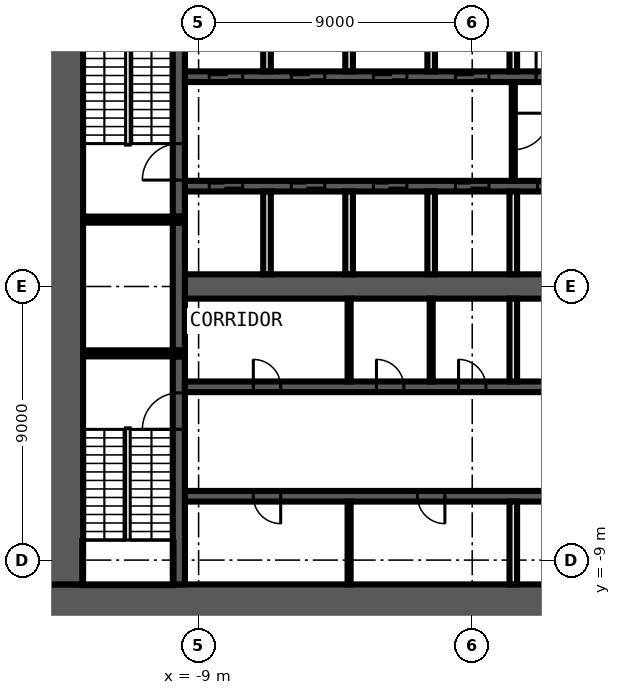
"""IFC4 building model, lengths in metres.
Left out: names, types, materials, properties, quantities, classifications, styles, units other than length and angle.
Written with IfcOpenShell. Run it as: python <this file> out.ifc"""

import sys

from ifc_helpers import new_model, si_unit, direction, frame, frame_2d, origin, place, context, subcontext, project, spatial, rectangle, extrude, element, fill, save


model = new_model("IFC4")
c1 = context("Model", 3, precision=1e-05, world=origin(), true_north=direction((0.0, 1.0)))
c2 = subcontext(c1, "Body", "Model", "MODEL_VIEW")
j1 = project(units=[si_unit("LENGTHUNIT", "METRE"), si_unit("PLANEANGLEUNIT", "RADIAN")], contexts=[c1])
p1 = place(None, origin())
s1 = spatial("IfcSite", under=j1, at=p1, CompositionType="ELEMENT")
p2 = place(p1, origin())
s2 = spatial("IfcBuilding", under=s1, at=p2, CompositionType="ELEMENT")
p3 = place(p2, frame((0.0, 0.0, 33.0)))
s3 = spatial("IfcBuildingStorey", under=s2, at=p3, CompositionType="ELEMENT", Elevation=33.0)
p4 = place(p3, frame((14.0, -10.4, 0.0), z_axis=(0.0, 0.0, 1.0), x_axis=(-1.0, 0.0, 0.0)))
e1 = element("IfcWall", 1, at=p4, inside=s3, PredefinedType="SHEAR", context=c2, shape_type="SweptSolid", body=[
    extrude(rectangle(XDim=28.0, YDim=1.2, at=frame_2d((14.0, 0.0))), origin(), (0.0, 0.0, 1.0), 4.6),
])
p5 = place(p4, frame((5.1, 0.0, 0.0)))
e2 = element("IfcOpeningElement", 2, at=p5, cuts=e1, PredefinedType="OPENING", context=c2, shape_type="SweptSolid", body=[
    extrude(rectangle(XDim=1.6, YDim=2.1, at=frame_2d((0.8, 1.05))), frame((0.0, 0.61, 0.0), z_axis=(0.0, -1.0, 0.0), x_axis=(1.0, 0.0, 0.0)), (0.0, 0.0, 1.0), 1.22),
])
p6 = place(p3, frame((-13.4, -9.8, 0.0), z_axis=(0.0, 0.0, 1.0), x_axis=(0.0, 1.0, 0.0)))
e3 = element("IfcWall", 3, at=p6, inside=s3, PredefinedType="SHEAR", context=c2, shape_type="SweptSolid", body=[
    extrude(rectangle(XDim=19.6, YDim=1.2, at=frame_2d((9.8, 0.0))), origin(), (0.0, 0.0, 1.0), 4.6),
])
p7 = place(p3, frame((-9.65, -9.8, 0.0), z_axis=(0.0, 0.0, 1.0), x_axis=(0.0, 1.0, 0.0)))
e4 = element("IfcWall", 4, at=p7, inside=s3, PredefinedType="SHEAR", context=c2, shape_type="SweptSolid", body=[
    extrude(rectangle(XDim=7.5, YDim=0.4, at=frame_2d((3.75, 0.0))), origin(), (0.0, 0.0, 1.0), 4.6),
])
p8 = place(p7, frame((5.1, 0.0, 0.0)))
e5 = element("IfcOpeningElement", 5, at=p8, cuts=e4, PredefinedType="OPENING", context=c2, shape_type="SweptSolid", body=[
    extrude(rectangle(XDim=1.2, YDim=2.1, at=frame_2d((0.6, 1.05))), frame((0.0, 0.21, 0.0), z_axis=(0.0, -1.0, 0.0), x_axis=(1.0, 0.0, 0.0)), (0.0, 0.0, 1.0), 0.42),
])
p9 = place(p3, frame((-9.65, -2.1, 0.0), z_axis=(0.0, 0.0, 1.0), x_axis=(0.0, 1.0, 0.0)))
e6 = element("IfcWall", 6, at=p9, inside=s3, PredefinedType="SHEAR", context=c2, shape_type="SweptSolid", body=[
    extrude(rectangle(XDim=4.2, YDim=0.4, at=frame_2d((2.1, 0.0))), origin(), (0.0, 0.0, 1.0), 4.6),
])
p10 = place(p3, frame((-9.65, 2.3, 0.0), z_axis=(0.0, 0.0, 1.0), x_axis=(0.0, 1.0, 0.0)))
e7 = element("IfcWall", 7, at=p10, inside=s3, PredefinedType="SHEAR", context=c2, shape_type="SweptSolid", body=[
    extrude(rectangle(XDim=7.5, YDim=0.4, at=frame_2d((3.75, 0.0))), origin(), (0.0, 0.0, 1.0), 4.6),
])
p11 = place(p10, frame((1.2, 0.0, 0.0)))
e8 = element("IfcOpeningElement", 8, at=p11, cuts=e7, PredefinedType="OPENING", context=c2, shape_type="SweptSolid", body=[
    extrude(rectangle(XDim=1.2, YDim=2.1, at=frame_2d((0.6, 1.05))), frame((0.0, 0.21, 0.0), z_axis=(0.0, -1.0, 0.0), x_axis=(1.0, 0.0, 0.0)), (0.0, 0.0, 1.0), 0.42),
])
for number, where, z_axis, x_axis in (
    (9, (-9.45, 2.2, 0.0), (0.0, 0.0, 1.0), (-1.0, 0.0, 0.0)),
    (10, (-9.45, -2.2, 0.0), (0.0, 0.0, 1.0), (-1.0, 0.0, 0.0)),
):
    element("IfcWall", number, at=place(p3, frame(where, z_axis=z_axis, x_axis=x_axis)), inside=s3, PredefinedType="SHEAR", context=c2, shape_type="SweptSolid", body=[
        extrude(rectangle(XDim=3.35, YDim=0.2, at=frame_2d((1.675, 0.0))), origin(), (0.0, 0.0, 1.0), 4.6),
    ])
p12 = place(p3, frame((-9.45, 6.9, 0.0), z_axis=(0.0, 0.0, 1.0), x_axis=(1.0, 0.0, 0.0)))
e11 = element("IfcWall", 11, at=p12, inside=s3, PredefinedType="SHEAR", context=c2, shape_type="SweptSolid", body=[
    extrude(rectangle(XDim=18.9, YDim=0.35, at=frame_2d((9.45, 0.0))), origin(), (0.0, 0.0, 1.0), 4.6),
])
p13 = place(p12, frame((0.8, 0.0, 0.0)))
e12 = element("IfcOpeningElement", 12, at=p13, cuts=e11, PredefinedType="OPENING", context=c2, shape_type="SweptSolid", body=[
    extrude(rectangle(XDim=1.1, YDim=2.1, at=frame_2d((0.55, 1.05))), frame((0.0, 0.185, 0.0), z_axis=(0.0, -1.0, 0.0), x_axis=(1.0, 0.0, 0.0)), (0.0, 0.0, 1.0), 0.37),
])
p14 = place(p12, frame((3.5, 0.0, 0.0)))
e13 = element("IfcOpeningElement", 13, at=p14, cuts=e11, PredefinedType="OPENING", context=c2, shape_type="SweptSolid", body=[
    extrude(rectangle(XDim=1.1, YDim=2.1, at=frame_2d((0.55, 1.05))), frame((0.0, 0.185, 0.0), z_axis=(0.0, -1.0, 0.0), x_axis=(1.0, 0.0, 0.0)), (0.0, 0.0, 1.0), 0.37),
])
p15 = place(p12, frame((6.2, 0.0, 0.0)))
e14 = element("IfcOpeningElement", 14, at=p15, cuts=e11, PredefinedType="OPENING", context=c2, shape_type="SweptSolid", body=[
    extrude(rectangle(XDim=1.1, YDim=2.1, at=frame_2d((0.55, 1.05))), frame((0.0, 0.185, 0.0), z_axis=(0.0, -1.0, 0.0), x_axis=(1.0, 0.0, 0.0)), (0.0, 0.0, 1.0), 0.37),
])
p16 = place(p12, frame((8.9, 0.0, 0.0)))
e15 = element("IfcOpeningElement", 15, at=p16, cuts=e11, PredefinedType="OPENING", context=c2, shape_type="SweptSolid", body=[
    extrude(rectangle(XDim=1.1, YDim=2.1, at=frame_2d((0.55, 1.05))), frame((0.0, 0.185, 0.0), z_axis=(0.0, -1.0, 0.0), x_axis=(1.0, 0.0, 0.0)), (0.0, 0.0, 1.0), 0.37),
])
p17 = place(p12, frame((11.55, 0.0, 0.0)))
e16 = element("IfcOpeningElement", 16, at=p17, cuts=e11, PredefinedType="OPENING", context=c2, shape_type="SweptSolid", body=[
    extrude(rectangle(XDim=1.2, YDim=2.1, at=frame_2d((0.6, 1.05))), frame((0.0, 0.185, 0.0), z_axis=(0.0, -1.0, 0.0), x_axis=(1.0, 0.0, 0.0)), (0.0, 0.0, 1.0), 0.37),
])
p18 = place(p12, frame((14.3, 0.0, 0.0)))
e17 = element("IfcOpeningElement", 17, at=p18, cuts=e11, PredefinedType="OPENING", context=c2, shape_type="SweptSolid", body=[
    extrude(rectangle(XDim=1.1, YDim=2.1, at=frame_2d((0.55, 1.05))), frame((0.0, 0.185, 0.0), z_axis=(0.0, -1.0, 0.0), x_axis=(1.0, 0.0, 0.0)), (0.0, 0.0, 1.0), 0.37),
])
p19 = place(p12, frame((17.0, 0.0, 0.0)))
e18 = element("IfcOpeningElement", 18, at=p19, cuts=e11, PredefinedType="OPENING", context=c2, shape_type="SweptSolid", body=[
    extrude(rectangle(XDim=1.1, YDim=2.1, at=frame_2d((0.55, 1.05))), frame((0.0, 0.185, 0.0), z_axis=(0.0, -1.0, 0.0), x_axis=(1.0, 0.0, 0.0)), (0.0, 0.0, 1.0), 0.37),
])
p20 = place(p3, frame((9.45, 3.3, 0.0), z_axis=(0.0, 0.0, 1.0), x_axis=(-1.0, 0.0, 0.0)))
e19 = element("IfcWall", 19, at=p20, inside=s3, PredefinedType="SHEAR", context=c2, shape_type="SweptSolid", body=[
    extrude(rectangle(XDim=18.9, YDim=0.35, at=frame_2d((9.45, 0.0))), origin(), (0.0, 0.0, 1.0), 4.6),
])
p21 = place(p20, frame((17.0, 0.0, 0.0)))
e20 = element("IfcOpeningElement", 20, at=p21, cuts=e19, PredefinedType="OPENING", context=c2, shape_type="SweptSolid", body=[
    extrude(rectangle(XDim=1.1, YDim=2.1, at=frame_2d((0.55, 1.05))), frame((0.0, 0.185, 0.0), z_axis=(0.0, -1.0, 0.0), x_axis=(1.0, 0.0, 0.0)), (0.0, 0.0, 1.0), 0.37),
])
p22 = place(p20, frame((14.3, 0.0, 0.0)))
e21 = element("IfcOpeningElement", 21, at=p22, cuts=e19, PredefinedType="OPENING", context=c2, shape_type="SweptSolid", body=[
    extrude(rectangle(XDim=1.1, YDim=2.1, at=frame_2d((0.55, 1.05))), frame((0.0, 0.185, 0.0), z_axis=(0.0, -1.0, 0.0), x_axis=(1.0, 0.0, 0.0)), (0.0, 0.0, 1.0), 0.37),
])
p23 = place(p20, frame((11.6, 0.0, 0.0)))
e22 = element("IfcOpeningElement", 22, at=p23, cuts=e19, PredefinedType="OPENING", context=c2, shape_type="SweptSolid", body=[
    extrude(rectangle(XDim=1.1, YDim=2.1, at=frame_2d((0.55, 1.05))), frame((0.0, 0.185, 0.0), z_axis=(0.0, -1.0, 0.0), x_axis=(1.0, 0.0, 0.0)), (0.0, 0.0, 1.0), 0.37),
])
p24 = place(p20, frame((8.9, 0.0, 0.0)))
e23 = element("IfcOpeningElement", 23, at=p24, cuts=e19, PredefinedType="OPENING", context=c2, shape_type="SweptSolid", body=[
    extrude(rectangle(XDim=1.1, YDim=2.1, at=frame_2d((0.55, 1.05))), frame((0.0, 0.185, 0.0), z_axis=(0.0, -1.0, 0.0), x_axis=(1.0, 0.0, 0.0)), (0.0, 0.0, 1.0), 0.37),
])
p25 = place(p20, frame((6.2, 0.0, 0.0)))
e24 = element("IfcOpeningElement", 24, at=p25, cuts=e19, PredefinedType="OPENING", context=c2, shape_type="SweptSolid", body=[
    extrude(rectangle(XDim=1.1, YDim=2.1, at=frame_2d((0.55, 1.05))), frame((0.0, 0.185, 0.0), z_axis=(0.0, -1.0, 0.0), x_axis=(1.0, 0.0, 0.0)), (0.0, 0.0, 1.0), 0.37),
])
p26 = place(p20, frame((3.5, 0.0, 0.0)))
e25 = element("IfcOpeningElement", 25, at=p26, cuts=e19, PredefinedType="OPENING", context=c2, shape_type="SweptSolid", body=[
    extrude(rectangle(XDim=1.1, YDim=2.1, at=frame_2d((0.55, 1.05))), frame((0.0, 0.185, 0.0), z_axis=(0.0, -1.0, 0.0), x_axis=(1.0, 0.0, 0.0)), (0.0, 0.0, 1.0), 0.37),
])
p27 = place(p20, frame((0.9, 0.0, 0.0)))
e26 = element("IfcOpeningElement", 26, at=p27, cuts=e19, PredefinedType="OPENING", context=c2, shape_type="SweptSolid", body=[
    extrude(rectangle(XDim=0.9, YDim=2.1, at=frame_2d((0.45, 1.05))), frame((0.0, 0.185, 0.0), z_axis=(0.0, -1.0, 0.0), x_axis=(1.0, 0.0, 0.0)), (0.0, 0.0, 1.0), 0.37),
])
p28 = place(p3, frame((-9.45, -3.3, 0.0), z_axis=(0.0, 0.0, 1.0), x_axis=(1.0, 0.0, 0.0)))
e27 = element("IfcWall", 27, at=p28, inside=s3, PredefinedType="SHEAR", context=c2, shape_type="SweptSolid", body=[
    extrude(rectangle(XDim=18.9, YDim=0.35, at=frame_2d((9.45, 0.0))), origin(), (0.0, 0.0, 1.0), 4.6),
])
p29 = place(p28, frame((17.0, 0.0, 0.0)))
e28 = element("IfcOpeningElement", 28, at=p29, cuts=e27, PredefinedType="OPENING", context=c2, shape_type="SweptSolid", body=[
    extrude(rectangle(XDim=1.1, YDim=2.1, at=frame_2d((0.55, 1.05))), frame((0.0, 0.185, 0.0), z_axis=(0.0, -1.0, 0.0), x_axis=(1.0, 0.0, 0.0)), (0.0, 0.0, 1.0), 0.37),
])
p30 = place(p28, frame((2.25, 0.0, 0.0)))
e29 = element("IfcOpeningElement", 29, at=p30, cuts=e27, PredefinedType="OPENING", context=c2, shape_type="SweptSolid", body=[
    extrude(rectangle(XDim=0.9, YDim=2.1, at=frame_2d((0.45, 1.05))), frame((0.0, 0.185, 0.0), z_axis=(0.0, -1.0, 0.0), x_axis=(1.0, 0.0, 0.0)), (0.0, 0.0, 1.0), 0.37),
])
p31 = place(p28, frame((6.3, 0.0, 0.0)))
e30 = element("IfcOpeningElement", 30, at=p31, cuts=e27, PredefinedType="OPENING", context=c2, shape_type="SweptSolid", body=[
    extrude(rectangle(XDim=0.9, YDim=2.1, at=frame_2d((0.45, 1.05))), frame((0.0, 0.185, 0.0), z_axis=(0.0, -1.0, 0.0), x_axis=(1.0, 0.0, 0.0)), (0.0, 0.0, 1.0), 0.37),
])
p32 = place(p28, frame((9.0, 0.0, 0.0)))
e31 = element("IfcOpeningElement", 31, at=p32, cuts=e27, PredefinedType="OPENING", context=c2, shape_type="SweptSolid", body=[
    extrude(rectangle(XDim=0.9, YDim=2.1, at=frame_2d((0.45, 1.05))), frame((0.0, 0.185, 0.0), z_axis=(0.0, -1.0, 0.0), x_axis=(1.0, 0.0, 0.0)), (0.0, 0.0, 1.0), 0.37),
])
p33 = place(p3, frame((9.45, -6.9, 0.0), z_axis=(0.0, 0.0, 1.0), x_axis=(-1.0, 0.0, 0.0)))
e32 = element("IfcWall", 32, at=p33, inside=s3, PredefinedType="SHEAR", context=c2, shape_type="SweptSolid", body=[
    extrude(rectangle(XDim=18.9, YDim=0.35, at=frame_2d((9.45, 0.0))), origin(), (0.0, 0.0, 1.0), 4.6),
])
p34 = place(p33, frame((0.75, 0.0, 0.0)))
e33 = element("IfcOpeningElement", 33, at=p34, cuts=e32, PredefinedType="OPENING", context=c2, shape_type="SweptSolid", body=[
    extrude(rectangle(XDim=1.2, YDim=2.1, at=frame_2d((0.6, 1.05))), frame((0.0, 0.185, 0.0), z_axis=(0.0, -1.0, 0.0), x_axis=(1.0, 0.0, 0.0)), (0.0, 0.0, 1.0), 0.37),
])
p35 = place(p33, frame((15.75, 0.0, 0.0)))
e34 = element("IfcOpeningElement", 34, at=p35, cuts=e32, PredefinedType="OPENING", context=c2, shape_type="SweptSolid", body=[
    extrude(rectangle(XDim=0.9, YDim=2.1, at=frame_2d((0.45, 1.05))), frame((0.0, 0.185, 0.0), z_axis=(0.0, -1.0, 0.0), x_axis=(1.0, 0.0, 0.0)), (0.0, 0.0, 1.0), 0.37),
])
p36 = place(p33, frame((10.35, 0.0, 0.0)))
e35 = element("IfcOpeningElement", 35, at=p36, cuts=e32, PredefinedType="OPENING", context=c2, shape_type="SweptSolid", body=[
    extrude(rectangle(XDim=0.9, YDim=2.1, at=frame_2d((0.45, 1.05))), frame((0.0, 0.185, 0.0), z_axis=(0.0, -1.0, 0.0), x_axis=(1.0, 0.0, 0.0)), (0.0, 0.0, 1.0), 0.37),
])
p37 = place(p3, frame((-9.45, 0.0, 0.0), z_axis=(0.0, 0.0, 1.0), x_axis=(1.0, 0.0, 0.0)))
e36 = element("IfcWall", 36, at=p37, inside=s3, PredefinedType="SHEAR", context=c2, shape_type="SweptSolid", body=[
    extrude(rectangle(XDim=18.9, YDim=0.8, at=frame_2d((9.45, 0.0))), origin(), (0.0, 0.0, 1.0), 4.6),
])
p38 = place(p3, frame((1.35, 6.725, 0.0), z_axis=(0.0, 0.0, 1.0), x_axis=(0.0, -1.0, 0.0)))
e37 = element("IfcWall", 37, at=p38, inside=s3, PredefinedType="PARTITIONING", context=c2, shape_type="SweptSolid", body=[
    extrude(rectangle(XDim=3.25, YDim=0.1, at=frame_2d((1.625, 0.0))), origin(), (0.0, 0.0, 1.0), 4.6),
])
p39 = place(p38, frame((1.025, 0.0, 0.0)))
e38 = element("IfcOpeningElement", 38, at=p39, cuts=e37, PredefinedType="OPENING", context=c2, shape_type="SweptSolid", body=[
    extrude(rectangle(XDim=1.2, YDim=2.1, at=frame_2d((0.6, 1.05))), frame((0.0, 0.06, 0.0), z_axis=(0.0, -1.0, 0.0), x_axis=(1.0, 0.0, 0.0)), (0.0, 0.0, 1.0), 0.12),
])
for number, where, z_axis, x_axis in (
    (39, (1.35, -9.8, 0.0), (0.0, 0.0, 1.0), (0.0, 1.0, 0.0)),
    (40, (1.35, -3.125, 0.0), (0.0, 0.0, 1.0), (0.0, 1.0, 0.0)),
    (41, (1.35, 0.4, 0.0), (0.0, 0.0, 1.0), (0.0, 1.0, 0.0)),
    (42, (1.35, 7.075, 0.0), (0.0, 0.0, 1.0), (0.0, 1.0, 0.0)),
):
    element("IfcWall", number, at=place(p3, frame(where, z_axis=z_axis, x_axis=x_axis)), inside=s3, PredefinedType="SOLIDWALL", context=c2, shape_type="SweptSolid", body=[
        extrude(rectangle(XDim=2.725, YDim=0.25, at=frame_2d((1.363, 0.0))), origin(), (0.0, 0.0, 1.0), 4.6),
    ])
p40 = place(p3, frame((-1.35, -3.125, 0.0), z_axis=(0.0, 0.0, 1.0), x_axis=(0.0, 1.0, 0.0)))
e43 = element("IfcWall", 43, at=p40, inside=s3, PredefinedType="PARTITIONING", context=c2, shape_type="SweptSolid", body=[
    extrude(rectangle(XDim=2.725, YDim=0.1, at=frame_2d((1.363, 0.0))), origin(), (0.0, 0.0, 1.0), 4.6),
])
for number, where, z_axis, x_axis in (
    (44, (-1.35, 0.4, 0.0), (0.0, 0.0, 1.0), (0.0, 1.0, 0.0)),
    (45, (-1.35, 7.075, 0.0), (0.0, 0.0, 1.0), (0.0, 1.0, 0.0)),
):
    element("IfcWall", number, at=place(p3, frame(where, z_axis=z_axis, x_axis=x_axis)), inside=s3, PredefinedType="SOLIDWALL", context=c2, shape_type="SweptSolid", body=[
        extrude(rectangle(XDim=2.725, YDim=0.25, at=frame_2d((1.363, 0.0))), origin(), (0.0, 0.0, 1.0), 4.6),
    ])
for number, where, z_axis, x_axis in (
    (46, (-4.05, -9.8, 0.0), (0.0, 0.0, 1.0), (0.0, 1.0, 0.0)),
    (47, (-4.05, -3.125, 0.0), (0.0, 0.0, 1.0), (0.0, 1.0, 0.0)),
):
    element("IfcWall", number, at=place(p3, frame(where, z_axis=z_axis, x_axis=x_axis)), inside=s3, PredefinedType="PARTITIONING", context=c2, shape_type="SweptSolid", body=[
        extrude(rectangle(XDim=2.725, YDim=0.1, at=frame_2d((1.363, 0.0))), origin(), (0.0, 0.0, 1.0), 4.6),
    ])
for number, where, z_axis, x_axis in (
    (48, (-4.05, 0.4, 0.0), (0.0, 0.0, 1.0), (0.0, 1.0, 0.0)),
    (49, (-4.05, 7.075, 0.0), (0.0, 0.0, 1.0), (0.0, 1.0, 0.0)),
    (50, (-6.75, 0.4, 0.0), (0.0, 0.0, 1.0), (0.0, 1.0, 0.0)),
    (51, (-6.75, 7.075, 0.0), (0.0, 0.0, 1.0), (0.0, 1.0, 0.0)),
):
    element("IfcWall", number, at=place(p3, frame(where, z_axis=z_axis, x_axis=x_axis)), inside=s3, PredefinedType="SOLIDWALL", context=c2, shape_type="SweptSolid", body=[
        extrude(rectangle(XDim=2.725, YDim=0.25, at=frame_2d((1.363, 0.0))), origin(), (0.0, 0.0, 1.0), 4.6),
    ])
p41 = place(p13, origin())
e52 = element("IfcDoor", 52, at=p41, inside=s3, OperationType="DOUBLE_DOOR_SLIDING", PredefinedType="DOOR", context=c2, shape_type="SweptSolid", body=[
    extrude(rectangle(XDim=1.1, YDim=2.1, at=frame_2d((0.55, 1.05))), frame((0.0, 0.025, 0.0), z_axis=(0.0, -1.0, 0.0), x_axis=(1.0, 0.0, 0.0)), (0.0, 0.0, 1.0), 0.05),
])
fill(e12, e52)
p42 = place(p14, origin())
e53 = element("IfcDoor", 53, at=p42, inside=s3, OperationType="DOUBLE_DOOR_SLIDING", PredefinedType="DOOR", context=c2, shape_type="SweptSolid", body=[
    extrude(rectangle(XDim=1.1, YDim=2.1, at=frame_2d((0.55, 1.05))), frame((0.0, 0.025, 0.0), z_axis=(0.0, -1.0, 0.0), x_axis=(1.0, 0.0, 0.0)), (0.0, 0.0, 1.0), 0.05),
])
fill(e13, e53)
p43 = place(p15, origin())
e54 = element("IfcDoor", 54, at=p43, inside=s3, OperationType="DOUBLE_DOOR_SLIDING", PredefinedType="DOOR", context=c2, shape_type="SweptSolid", body=[
    extrude(rectangle(XDim=1.1, YDim=2.1, at=frame_2d((0.55, 1.05))), frame((0.0, 0.025, 0.0), z_axis=(0.0, -1.0, 0.0), x_axis=(1.0, 0.0, 0.0)), (0.0, 0.0, 1.0), 0.05),
])
fill(e14, e54)
p44 = place(p16, origin())
e55 = element("IfcDoor", 55, at=p44, inside=s3, OperationType="DOUBLE_DOOR_SLIDING", PredefinedType="DOOR", context=c2, shape_type="SweptSolid", body=[
    extrude(rectangle(XDim=1.1, YDim=2.1, at=frame_2d((0.55, 1.05))), frame((0.0, 0.025, 0.0), z_axis=(0.0, -1.0, 0.0), x_axis=(1.0, 0.0, 0.0)), (0.0, 0.0, 1.0), 0.05),
])
fill(e15, e55)
p45 = place(p17, origin())
e56 = element("IfcDoor", 56, at=p45, inside=s3, OperationType="SINGLE_SWING_LEFT", PredefinedType="DOOR", context=c2, shape_type="SweptSolid", body=[
    extrude(rectangle(XDim=1.2, YDim=2.1, at=frame_2d((0.6, 1.05))), frame((0.0, 0.025, 0.0), z_axis=(0.0, -1.0, 0.0), x_axis=(1.0, 0.0, 0.0)), (0.0, 0.0, 1.0), 0.05),
])
fill(e16, e56)
p46 = place(p21, origin())
e57 = element("IfcDoor", 57, at=p46, inside=s3, OperationType="DOUBLE_DOOR_SLIDING", PredefinedType="DOOR", context=c2, shape_type="SweptSolid", body=[
    extrude(rectangle(XDim=1.1, YDim=2.1, at=frame_2d((0.55, 1.05))), frame((0.0, 0.025, 0.0), z_axis=(0.0, -1.0, 0.0), x_axis=(1.0, 0.0, 0.0)), (0.0, 0.0, 1.0), 0.05),
])
fill(e20, e57)
p47 = place(p22, origin())
e58 = element("IfcDoor", 58, at=p47, inside=s3, OperationType="DOUBLE_DOOR_SLIDING", PredefinedType="DOOR", context=c2, shape_type="SweptSolid", body=[
    extrude(rectangle(XDim=1.1, YDim=2.1, at=frame_2d((0.55, 1.05))), frame((0.0, 0.025, 0.0), z_axis=(0.0, -1.0, 0.0), x_axis=(1.0, 0.0, 0.0)), (0.0, 0.0, 1.0), 0.05),
])
fill(e21, e58)
p48 = place(p23, origin())
e59 = element("IfcDoor", 59, at=p48, inside=s3, OperationType="DOUBLE_DOOR_SLIDING", PredefinedType="DOOR", context=c2, shape_type="SweptSolid", body=[
    extrude(rectangle(XDim=1.1, YDim=2.1, at=frame_2d((0.55, 1.05))), frame((0.0, 0.025, 0.0), z_axis=(0.0, -1.0, 0.0), x_axis=(1.0, 0.0, 0.0)), (0.0, 0.0, 1.0), 0.05),
])
fill(e22, e59)
p49 = place(p24, origin())
e60 = element("IfcDoor", 60, at=p49, inside=s3, OperationType="DOUBLE_DOOR_SLIDING", PredefinedType="DOOR", context=c2, shape_type="SweptSolid", body=[
    extrude(rectangle(XDim=1.1, YDim=2.1, at=frame_2d((0.55, 1.05))), frame((0.0, 0.025, 0.0), z_axis=(0.0, -1.0, 0.0), x_axis=(1.0, 0.0, 0.0)), (0.0, 0.0, 1.0), 0.05),
])
fill(e23, e60)
p50 = place(p25, origin())
e61 = element("IfcDoor", 61, at=p50, inside=s3, OperationType="DOUBLE_DOOR_SLIDING", PredefinedType="DOOR", context=c2, shape_type="SweptSolid", body=[
    extrude(rectangle(XDim=1.1, YDim=2.1, at=frame_2d((0.55, 1.05))), frame((0.0, 0.025, 0.0), z_axis=(0.0, -1.0, 0.0), x_axis=(1.0, 0.0, 0.0)), (0.0, 0.0, 1.0), 0.05),
])
fill(e24, e61)
p51 = place(p30, origin())
e62 = element("IfcDoor", 62, at=p51, inside=s3, OperationType="SINGLE_SWING_RIGHT", PredefinedType="DOOR", context=c2, shape_type="SweptSolid", body=[
    extrude(rectangle(XDim=0.9, YDim=2.1, at=frame_2d((0.45, 1.05))), frame((0.0, 0.025, 0.0), z_axis=(0.0, -1.0, 0.0), x_axis=(1.0, 0.0, 0.0)), (0.0, 0.0, 1.0), 0.05),
])
fill(e29, e62)
p52 = place(p31, origin())
e63 = element("IfcDoor", 63, at=p52, inside=s3, OperationType="SINGLE_SWING_LEFT", PredefinedType="DOOR", context=c2, shape_type="SweptSolid", body=[
    extrude(rectangle(XDim=0.9, YDim=2.1, at=frame_2d((0.45, 1.05))), frame((0.0, 0.025, 0.0), z_axis=(0.0, -1.0, 0.0), x_axis=(1.0, 0.0, 0.0)), (0.0, 0.0, 1.0), 0.05),
])
fill(e30, e63)
p53 = place(p32, origin())
e64 = element("IfcDoor", 64, at=p53, inside=s3, OperationType="SINGLE_SWING_RIGHT", PredefinedType="DOOR", context=c2, shape_type="SweptSolid", body=[
    extrude(rectangle(XDim=0.9, YDim=2.1, at=frame_2d((0.45, 1.05))), frame((0.0, 0.025, 0.0), z_axis=(0.0, -1.0, 0.0), x_axis=(1.0, 0.0, 0.0)), (0.0, 0.0, 1.0), 0.05),
])
fill(e31, e64)
p54 = place(p35, origin())
e65 = element("IfcDoor", 65, at=p54, inside=s3, OperationType="SINGLE_SWING_LEFT", PredefinedType="DOOR", context=c2, shape_type="SweptSolid", body=[
    extrude(rectangle(XDim=0.9, YDim=2.1, at=frame_2d((0.45, 1.05))), frame((0.0, 0.025, 0.0), z_axis=(0.0, -1.0, 0.0), x_axis=(1.0, 0.0, 0.0)), (0.0, 0.0, 1.0), 0.05),
])
fill(e34, e65)
p55 = place(p36, origin())
e66 = element("IfcDoor", 66, at=p55, inside=s3, OperationType="SINGLE_SWING_RIGHT", PredefinedType="DOOR", context=c2, shape_type="SweptSolid", body=[
    extrude(rectangle(XDim=0.9, YDim=2.1, at=frame_2d((0.45, 1.05))), frame((0.0, 0.025, 0.0), z_axis=(0.0, -1.0, 0.0), x_axis=(1.0, 0.0, 0.0)), (0.0, 0.0, 1.0), 0.05),
])
fill(e35, e66)
p56 = place(p11, origin())
e67 = element("IfcDoor", 67, at=p56, inside=s3, OperationType="SINGLE_SWING_RIGHT", PredefinedType="DOOR", context=c2, shape_type="SweptSolid", body=[
    extrude(rectangle(XDim=1.2, YDim=2.1, at=frame_2d((0.6, 1.05))), frame((0.0, 0.025, 0.0), z_axis=(0.0, -1.0, 0.0), x_axis=(1.0, 0.0, 0.0)), (0.0, 0.0, 1.0), 0.05),
])
fill(e8, e67)
p57 = place(p8, origin())
e68 = element("IfcDoor", 68, at=p57, inside=s3, OperationType="SINGLE_SWING_LEFT", PredefinedType="DOOR", context=c2, shape_type="SweptSolid", body=[
    extrude(rectangle(XDim=1.2, YDim=2.1, at=frame_2d((0.6, 1.05))), frame((0.0, 0.025, 0.0), z_axis=(0.0, -1.0, 0.0), x_axis=(1.0, 0.0, 0.0)), (0.0, 0.0, 1.0), 0.05),
])
fill(e5, e68)
p58 = place(p39, origin())
e69 = element("IfcDoor", 69, at=p58, inside=s3, OperationType="SINGLE_SWING_LEFT", PredefinedType="DOOR", context=c2, shape_type="SweptSolid", body=[
    extrude(rectangle(XDim=1.2, YDim=2.1, at=frame_2d((0.6, 1.05))), frame((0.0, 0.025, 0.0), z_axis=(0.0, -1.0, 0.0), x_axis=(1.0, 0.0, 0.0)), (0.0, 0.0, 1.0), 0.05),
])
fill(e38, e69)
save(model, sys.argv[1])
